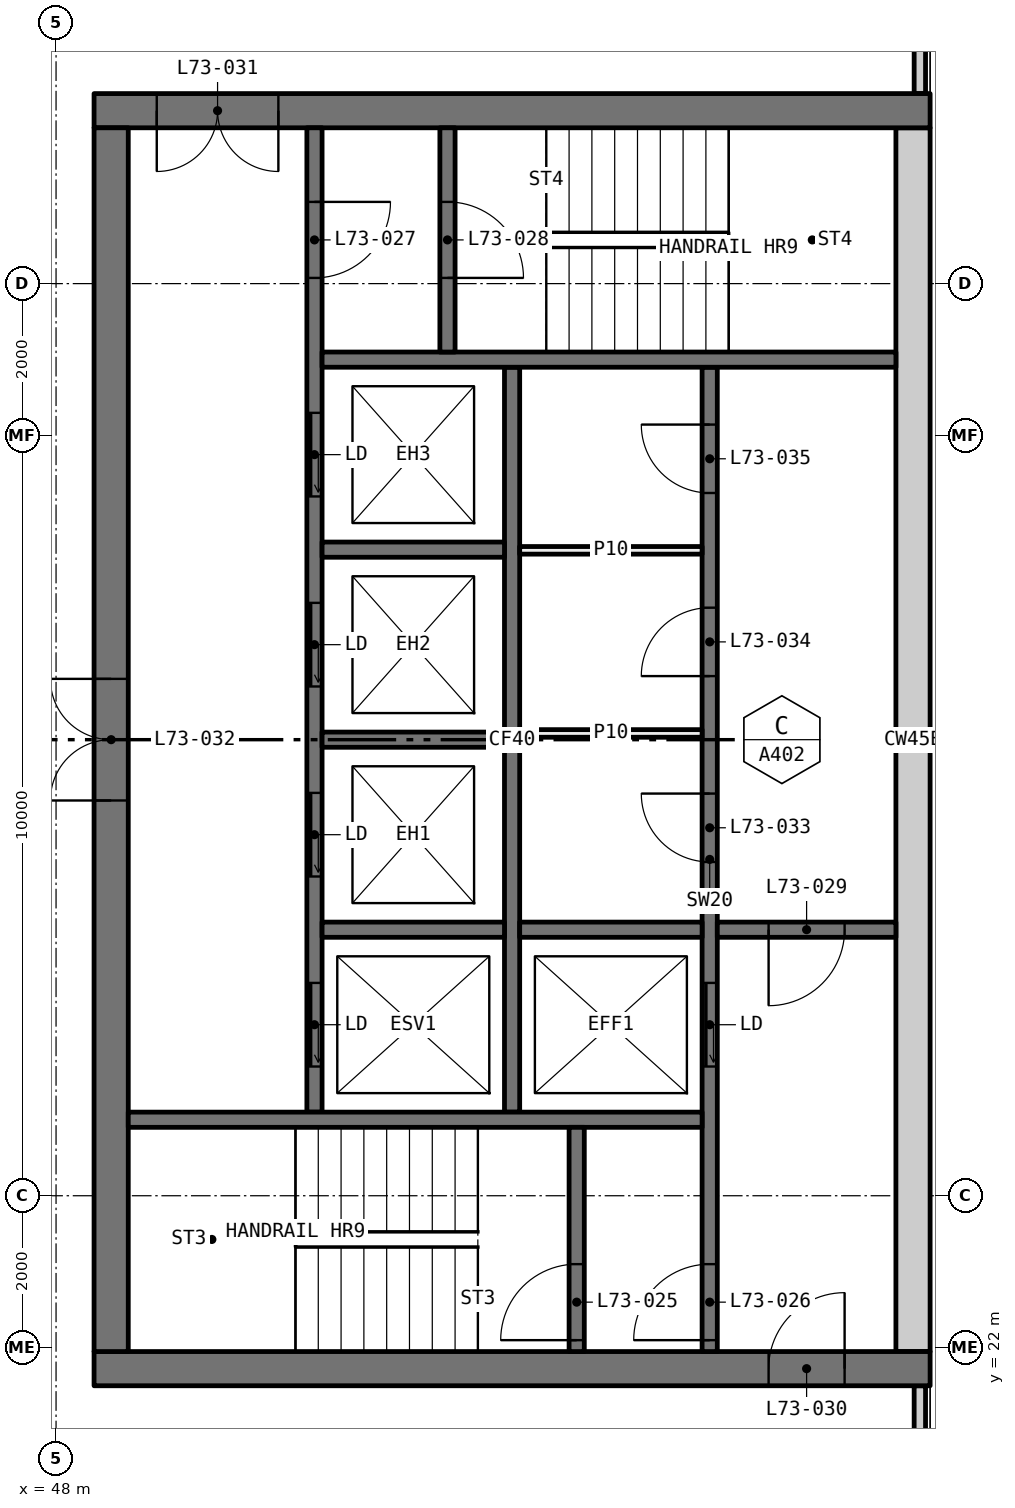
"""IFC4 building model, lengths in metres.
Left out: names, types, materials, properties, quantities, classifications, styles, units other than length and angle.
Written with IfcOpenShell. Run it as: python <this file> out.ifc"""

import sys

from ifc_helpers import new_model, si_unit, direction, frame, frame_2d, origin, place, context, subcontext, project, spatial, rectangle, extrude, element, fill, save


model = new_model("IFC4")
c1 = context("Model", 3, precision=1e-05, world=origin(), true_north=direction((0.0, 1.0)))
c2 = subcontext(c1, "Body", "Model", "MODEL_VIEW")
j1 = project(units=[si_unit("LENGTHUNIT", "METRE"), si_unit("PLANEANGLEUNIT", "RADIAN")], contexts=[c1])
p1 = place(None, origin())
s1 = spatial("IfcSite", under=j1, at=p1, CompositionType="ELEMENT")
p2 = place(p1, origin())
s2 = spatial("IfcBuilding", under=s1, at=p2, CompositionType="ELEMENT")
p3 = place(p2, frame((0.0, 0.0, 269.7)))
s3 = spatial("IfcBuildingStorey", under=s2, at=p3, CompositionType="ELEMENT", Elevation=269.7)
for number, where, z_axis, x_axis in (
    (1, (59.365, 18.71, 0.0), (0.0, 0.0, 1.0), (0.0, 1.0, 0.0)),
    (2, (59.365, 38.5, 0.0), (0.0, 0.0, 1.0), (0.0, 1.0, 0.0)),
):
    element("IfcWall", number, at=place(p3, frame(where, z_axis=z_axis, x_axis=x_axis)), inside=s3, PredefinedType="ELEMENTEDWALL", context=c2, shape_type="SweptSolid", body=[
        extrude(rectangle(XDim=2.79, YDim=0.15, at=frame_2d((1.395, 0.0))), origin(), (0.0, 0.0, 1.0), 3.05),
    ])
p4 = place(p3, frame((59.5, 21.725, 0.0), z_axis=(0.0, 0.0, 1.0), x_axis=(-1.0, 0.0, 0.0)))
e3 = element("IfcWall", 3, at=p4, inside=s3, PredefinedType="SHEAR", context=c2, shape_type="SweptSolid", body=[
    extrude(rectangle(XDim=11.0, YDim=0.45, at=frame_2d((5.5, 0.0))), origin(), (0.0, 0.0, 1.0), 3.05),
])
p5 = place(p4, frame((1.125, 0.0, 0.0)))
e4 = element("IfcOpeningElement", 4, at=p5, cuts=e3, PredefinedType="OPENING", context=c2, shape_type="SweptSolid", body=[
    extrude(rectangle(XDim=1.0, YDim=2.1, at=frame_2d((0.5, 1.05))), frame((0.0, 0.235, 0.0), z_axis=(0.0, -1.0, 0.0), x_axis=(1.0, 0.0, 0.0)), (0.0, 0.0, 1.0), 0.47),
])
p6 = place(p3, frame((59.5, 38.275, 0.0), z_axis=(0.0, 0.0, 1.0), x_axis=(-1.0, 0.0, 0.0)))
e5 = element("IfcWall", 5, at=p6, inside=s3, PredefinedType="SHEAR", context=c2, shape_type="SweptSolid", body=[
    extrude(rectangle(XDim=11.0, YDim=0.45, at=frame_2d((5.5, 0.0))), origin(), (0.0, 0.0, 1.0), 3.05),
])
p7 = place(p6, frame((8.575, 0.0, 0.0)))
e6 = element("IfcOpeningElement", 6, at=p7, cuts=e5, PredefinedType="OPENING", context=c2, shape_type="SweptSolid", body=[
    extrude(rectangle(XDim=1.6, YDim=2.1, at=frame_2d((0.8, 1.05))), frame((0.0, 0.235, 0.0), z_axis=(0.0, -1.0, 0.0), x_axis=(1.0, 0.0, 0.0)), (0.0, 0.0, 1.0), 0.47),
])
p8 = place(p3, frame((59.275, 21.95, 0.0), z_axis=(0.0, 0.0, 1.0), x_axis=(0.0, 1.0, 0.0)))
e7 = element("IfcWall", 7, at=p8, inside=s3, PredefinedType="SHEAR", context=c2, shape_type="SweptSolid", body=[
    extrude(rectangle(XDim=16.1, YDim=0.45, at=frame_2d((8.05, 0.0))), origin(), (0.0, 0.0, 1.0), 3.05),
])
p9 = place(p3, frame((48.725, 21.95, 0.0), z_axis=(0.0, 0.0, 1.0), x_axis=(0.0, 1.0, 0.0)))
e8 = element("IfcWall", 8, at=p9, inside=s3, PredefinedType="SHEAR", context=c2, shape_type="SweptSolid", body=[
    extrude(rectangle(XDim=16.1, YDim=0.45, at=frame_2d((8.05, 0.0))), origin(), (0.0, 0.0, 1.0), 3.05),
])
p10 = place(p9, frame((7.25, 0.0, 0.0)))
e9 = element("IfcOpeningElement", 9, at=p10, cuts=e8, PredefinedType="OPENING", context=c2, shape_type="SweptSolid", body=[
    extrude(rectangle(XDim=1.6, YDim=2.1, at=frame_2d((0.8, 1.05))), frame((0.0, 0.235, 0.0), z_axis=(0.0, -1.0, 0.0), x_axis=(1.0, 0.0, 0.0)), (0.0, 0.0, 1.0), 0.47),
])
p11 = place(p3, frame((56.6, 21.95, 0.0), z_axis=(0.0, 0.0, 1.0), x_axis=(0.0, 1.0, 0.0)))
e10 = element("IfcWall", 10, at=p11, inside=s3, PredefinedType="SOLIDWALL", context=c2, shape_type="SweptSolid", body=[
    extrude(rectangle(XDim=12.95, YDim=0.2, at=frame_2d((6.475, 0.0))), origin(), (0.0, 0.0, 1.0), 3.05),
])
p12 = place(p11, frame((3.75, 0.0, 0.0)))
e11 = element("IfcOpeningElement", 11, at=p12, cuts=e10, PredefinedType="OPENING", context=c2, shape_type="SweptSolid", body=[
    extrude(rectangle(XDim=1.1, YDim=2.1, at=frame_2d((0.55, 1.05))), frame((0.0, 0.11, 0.0), z_axis=(0.0, -1.0, 0.0), x_axis=(1.0, 0.0, 0.0)), (0.0, 0.0, 1.0), 0.22),
])
p13 = place(p11, frame((0.15, 0.0, 0.0)))
e12 = element("IfcOpeningElement", 12, at=p13, cuts=e10, PredefinedType="OPENING", context=c2, shape_type="SweptSolid", body=[
    extrude(rectangle(XDim=1.0, YDim=2.1, at=frame_2d((0.5, 1.05))), frame((0.0, 0.11, 0.0), z_axis=(0.0, -1.0, 0.0), x_axis=(1.0, 0.0, 0.0)), (0.0, 0.0, 1.0), 0.22),
])
p14 = place(p11, frame((6.441, 0.0, 0.0)))
e13 = element("IfcOpeningElement", 13, at=p14, cuts=e10, PredefinedType="OPENING", context=c2, shape_type="SweptSolid", body=[
    extrude(rectangle(XDim=0.9, YDim=2.1, at=frame_2d((0.45, 1.05))), frame((0.0, 0.11, 0.0), z_axis=(0.0, -1.0, 0.0), x_axis=(1.0, 0.0, 0.0)), (0.0, 0.0, 1.0), 0.22),
])
p15 = place(p11, frame((8.886, 0.0, 0.0)))
e14 = element("IfcOpeningElement", 14, at=p15, cuts=e10, PredefinedType="OPENING", context=c2, shape_type="SweptSolid", body=[
    extrude(rectangle(XDim=0.9, YDim=2.1, at=frame_2d((0.45, 1.05))), frame((0.0, 0.11, 0.0), z_axis=(0.0, -1.0, 0.0), x_axis=(1.0, 0.0, 0.0)), (0.0, 0.0, 1.0), 0.22),
])
p16 = place(p11, frame((11.295, 0.0, 0.0)))
e15 = element("IfcOpeningElement", 15, at=p16, cuts=e10, PredefinedType="OPENING", context=c2, shape_type="SweptSolid", body=[
    extrude(rectangle(XDim=0.9, YDim=2.1, at=frame_2d((0.45, 1.05))), frame((0.0, 0.11, 0.0), z_axis=(0.0, -1.0, 0.0), x_axis=(1.0, 0.0, 0.0)), (0.0, 0.0, 1.0), 0.22),
])
p17 = place(p3, frame((51.4, 25.1, 0.0), z_axis=(0.0, 0.0, 1.0), x_axis=(0.0, 1.0, 0.0)))
e16 = element("IfcWall", 16, at=p17, inside=s3, PredefinedType="SOLIDWALL", context=c2, shape_type="SweptSolid", body=[
    extrude(rectangle(XDim=12.95, YDim=0.2, at=frame_2d((6.475, 0.0))), origin(), (0.0, 0.0, 1.0), 3.05),
])
p18 = place(p17, frame((0.6, 0.0, 0.0)))
e17 = element("IfcOpeningElement", 17, at=p18, cuts=e16, PredefinedType="OPENING", context=c2, shape_type="SweptSolid", body=[
    extrude(rectangle(XDim=1.1, YDim=2.1, at=frame_2d((0.55, 1.05))), frame((0.0, 0.11, 0.0), z_axis=(0.0, -1.0, 0.0), x_axis=(1.0, 0.0, 0.0)), (0.0, 0.0, 1.0), 0.22),
])
p19 = place(p17, frame((3.1, 0.0, 0.0)))
e18 = element("IfcOpeningElement", 18, at=p19, cuts=e16, PredefinedType="OPENING", context=c2, shape_type="SweptSolid", body=[
    extrude(rectangle(XDim=1.1, YDim=2.1, at=frame_2d((0.55, 1.05))), frame((0.0, 0.11, 0.0), z_axis=(0.0, -1.0, 0.0), x_axis=(1.0, 0.0, 0.0)), (0.0, 0.0, 1.0), 0.22),
])
p20 = place(p17, frame((5.6, 0.0, 0.0)))
e19 = element("IfcOpeningElement", 19, at=p20, cuts=e16, PredefinedType="OPENING", context=c2, shape_type="SweptSolid", body=[
    extrude(rectangle(XDim=1.1, YDim=2.1, at=frame_2d((0.55, 1.05))), frame((0.0, 0.11, 0.0), z_axis=(0.0, -1.0, 0.0), x_axis=(1.0, 0.0, 0.0)), (0.0, 0.0, 1.0), 0.22),
])
p21 = place(p17, frame((8.1, 0.0, 0.0)))
e20 = element("IfcOpeningElement", 20, at=p21, cuts=e16, PredefinedType="OPENING", context=c2, shape_type="SweptSolid", body=[
    extrude(rectangle(XDim=1.1, YDim=2.1, at=frame_2d((0.55, 1.05))), frame((0.0, 0.11, 0.0), z_axis=(0.0, -1.0, 0.0), x_axis=(1.0, 0.0, 0.0)), (0.0, 0.0, 1.0), 0.22),
])
p22 = place(p17, frame((10.975, 0.0, 0.0)))
e21 = element("IfcOpeningElement", 21, at=p22, cuts=e16, PredefinedType="OPENING", context=c2, shape_type="SweptSolid", body=[
    extrude(rectangle(XDim=1.0, YDim=2.1, at=frame_2d((0.5, 1.05))), frame((0.0, 0.11, 0.0), z_axis=(0.0, -1.0, 0.0), x_axis=(1.0, 0.0, 0.0)), (0.0, 0.0, 1.0), 0.22),
])
p23 = place(p3, frame((54.0, 25.1, 0.0), z_axis=(0.0, 0.0, 1.0), x_axis=(0.0, 1.0, 0.0)))
e22 = element("IfcWall", 22, at=p23, inside=s3, PredefinedType="SOLIDWALL", context=c2, shape_type="SweptSolid", body=[
    extrude(rectangle(XDim=9.8, YDim=0.2, at=frame_2d((4.9, 0.0))), origin(), (0.0, 0.0, 1.0), 3.05),
])
for number, where, z_axis, x_axis in (
    (23, (56.5, 25.0, 0.0), (0.0, 0.0, 1.0), (-1.0, 0.0, 0.0)),
    (24, (59.05, 35.0, 0.0), (0.0, 0.0, 1.0), (-1.0, 0.0, 0.0)),
):
    element("IfcWall", number, at=place(p3, frame(where, z_axis=z_axis, x_axis=x_axis)), inside=s3, PredefinedType="SOLIDWALL", context=c2, shape_type="SweptSolid", body=[
        extrude(rectangle(XDim=7.55, YDim=0.2, at=frame_2d((3.775, 0.0))), origin(), (0.0, 0.0, 1.0), 3.05),
    ])
p24 = place(p3, frame((59.05, 27.5, 0.0), z_axis=(0.0, 0.0, 1.0), x_axis=(-1.0, 0.0, 0.0)))
e25 = element("IfcWall", 25, at=p24, inside=s3, PredefinedType="SOLIDWALL", context=c2, shape_type="SweptSolid", body=[
    extrude(rectangle(XDim=2.35, YDim=0.2, at=frame_2d((1.175, 0.0))), origin(), (0.0, 0.0, 1.0), 3.05),
])
p25 = place(p24, frame((0.675, 0.0, 0.0)))
e26 = element("IfcOpeningElement", 26, at=p25, cuts=e25, PredefinedType="OPENING", context=c2, shape_type="SweptSolid", body=[
    extrude(rectangle(XDim=1.0, YDim=2.1, at=frame_2d((0.5, 1.05))), frame((0.0, 0.11, 0.0), z_axis=(0.0, -1.0, 0.0), x_axis=(1.0, 0.0, 0.0)), (0.0, 0.0, 1.0), 0.22),
])
p26 = place(p3, frame((54.85, 21.95, 0.0), z_axis=(0.0, 0.0, 1.0), x_axis=(0.0, 1.0, 0.0)))
e27 = element("IfcWall", 27, at=p26, inside=s3, PredefinedType="SOLIDWALL", context=c2, shape_type="SweptSolid", body=[
    extrude(rectangle(XDim=2.95, YDim=0.2, at=frame_2d((1.475, 0.0))), origin(), (0.0, 0.0, 1.0), 3.05),
])
p27 = place(p26, frame((0.15, 0.0, 0.0)))
e28 = element("IfcOpeningElement", 28, at=p27, cuts=e27, PredefinedType="OPENING", context=c2, shape_type="SweptSolid", body=[
    extrude(rectangle(XDim=1.0, YDim=2.1, at=frame_2d((0.5, 1.05))), frame((0.0, 0.11, 0.0), z_axis=(0.0, -1.0, 0.0), x_axis=(1.0, 0.0, 0.0)), (0.0, 0.0, 1.0), 0.22),
])
p28 = place(p3, frame((53.15, 35.1, 0.0), z_axis=(0.0, 0.0, 1.0), x_axis=(0.0, 1.0, 0.0)))
e29 = element("IfcWall", 29, at=p28, inside=s3, PredefinedType="SOLIDWALL", context=c2, shape_type="SweptSolid", body=[
    extrude(rectangle(XDim=2.95, YDim=0.2, at=frame_2d((1.475, 0.0))), origin(), (0.0, 0.0, 1.0), 3.05),
])
p29 = place(p28, frame((0.975, 0.0, 0.0)))
e30 = element("IfcOpeningElement", 30, at=p29, cuts=e29, PredefinedType="OPENING", context=c2, shape_type="SweptSolid", body=[
    extrude(rectangle(XDim=1.0, YDim=2.1, at=frame_2d((0.5, 1.05))), frame((0.0, 0.11, 0.0), z_axis=(0.0, -1.0, 0.0), x_axis=(1.0, 0.0, 0.0)), (0.0, 0.0, 1.0), 0.22),
])
for number, where, z_axis, x_axis in (
    (31, (56.5, 27.5, 0.0), (0.0, 0.0, 1.0), (-1.0, 0.0, 0.0)),
    (32, (53.9, 27.5, 0.0), (0.0, 0.0, 1.0), (-1.0, 0.0, 0.0)),
    (33, (53.9, 30.0, 0.0), (0.0, 0.0, 1.0), (-1.0, 0.0, 0.0)),
    (34, (53.9, 32.5, 0.0), (0.0, 0.0, 1.0), (-1.0, 0.0, 0.0)),
):
    element("IfcWall", number, at=place(p3, frame(where, z_axis=z_axis, x_axis=x_axis)), inside=s3, PredefinedType="SOLIDWALL", context=c2, shape_type="SweptSolid", body=[
        extrude(rectangle(XDim=2.4, YDim=0.2, at=frame_2d((1.2, 0.0))), origin(), (0.0, 0.0, 1.0), 3.05),
    ])
for number, where, z_axis, x_axis in (
    (35, (56.5, 30.082, 0.0), (0.0, 0.0, 1.0), (-1.0, 0.0, 0.0)),
    (36, (56.5, 32.491, 0.0), (0.0, 0.0, 1.0), (-1.0, 0.0, 0.0)),
):
    element("IfcWall", number, at=place(p3, frame(where, z_axis=z_axis, x_axis=x_axis)), inside=s3, PredefinedType="PARTITIONING", context=c2, shape_type="SweptSolid", body=[
        extrude(rectangle(XDim=2.4, YDim=0.1, at=frame_2d((1.2, 0.0))), origin(), (0.0, 0.0, 1.0), 3.05),
    ])
p30 = place(p18, origin())
e37 = element("IfcDoor", 37, at=p30, inside=s3, OperationType="SLIDING_TO_LEFT", PredefinedType="DOOR", context=c2, shape_type="SweptSolid", body=[
    extrude(rectangle(XDim=1.1, YDim=2.1, at=frame_2d((0.55, 1.05))), frame((0.0, 0.025, 0.0), z_axis=(0.0, -1.0, 0.0), x_axis=(1.0, 0.0, 0.0)), (0.0, 0.0, 1.0), 0.05),
])
fill(e17, e37)
p31 = place(p19, origin())
e38 = element("IfcDoor", 38, at=p31, inside=s3, OperationType="SLIDING_TO_LEFT", PredefinedType="DOOR", context=c2, shape_type="SweptSolid", body=[
    extrude(rectangle(XDim=1.1, YDim=2.1, at=frame_2d((0.55, 1.05))), frame((0.0, 0.025, 0.0), z_axis=(0.0, -1.0, 0.0), x_axis=(1.0, 0.0, 0.0)), (0.0, 0.0, 1.0), 0.05),
])
fill(e18, e38)
p32 = place(p20, origin())
e39 = element("IfcDoor", 39, at=p32, inside=s3, OperationType="SLIDING_TO_LEFT", PredefinedType="DOOR", context=c2, shape_type="SweptSolid", body=[
    extrude(rectangle(XDim=1.1, YDim=2.1, at=frame_2d((0.55, 1.05))), frame((0.0, 0.025, 0.0), z_axis=(0.0, -1.0, 0.0), x_axis=(1.0, 0.0, 0.0)), (0.0, 0.0, 1.0), 0.05),
])
fill(e19, e39)
p33 = place(p21, origin())
e40 = element("IfcDoor", 40, at=p33, inside=s3, OperationType="SLIDING_TO_LEFT", PredefinedType="DOOR", context=c2, shape_type="SweptSolid", body=[
    extrude(rectangle(XDim=1.1, YDim=2.1, at=frame_2d((0.55, 1.05))), frame((0.0, 0.025, 0.0), z_axis=(0.0, -1.0, 0.0), x_axis=(1.0, 0.0, 0.0)), (0.0, 0.0, 1.0), 0.05),
])
fill(e20, e40)
p34 = place(p12, origin())
e41 = element("IfcDoor", 41, at=p34, inside=s3, OperationType="SLIDING_TO_LEFT", PredefinedType="DOOR", context=c2, shape_type="SweptSolid", body=[
    extrude(rectangle(XDim=1.1, YDim=2.1, at=frame_2d((0.55, 1.05))), frame((0.0, 0.025, 0.0), z_axis=(0.0, -1.0, 0.0), x_axis=(1.0, 0.0, 0.0)), (0.0, 0.0, 1.0), 0.05),
])
fill(e11, e41)
p35 = place(p27, origin())
e42 = element("IfcDoor", 42, at=p35, inside=s3, OperationType="SINGLE_SWING_RIGHT", PredefinedType="DOOR", context=c2, shape_type="SweptSolid", body=[
    extrude(rectangle(XDim=1.0, YDim=2.1, at=frame_2d((0.5, 1.05))), frame((0.0, 0.025, 0.0), z_axis=(0.0, -1.0, 0.0), x_axis=(1.0, 0.0, 0.0)), (0.0, 0.0, 1.0), 0.05),
])
fill(e28, e42)
p36 = place(p13, origin())
e43 = element("IfcDoor", 43, at=p36, inside=s3, OperationType="SINGLE_SWING_RIGHT", PredefinedType="DOOR", context=c2, shape_type="SweptSolid", body=[
    extrude(rectangle(XDim=1.0, YDim=2.1, at=frame_2d((0.5, 1.05))), frame((0.0, 0.025, 0.0), z_axis=(0.0, -1.0, 0.0), x_axis=(1.0, 0.0, 0.0)), (0.0, 0.0, 1.0), 0.05),
])
fill(e12, e43)
p37 = place(p22, frame((1.0, 0.0, 0.0), x_axis=(-1.0, 0.0, 0.0)))
e44 = element("IfcDoor", 44, at=p37, inside=s3, OperationType="SINGLE_SWING_RIGHT", PredefinedType="DOOR", context=c2, shape_type="SweptSolid", body=[
    extrude(rectangle(XDim=1.0, YDim=2.1, at=frame_2d((0.5, 1.05))), frame((0.0, 0.025, 0.0), z_axis=(0.0, -1.0, 0.0), x_axis=(1.0, 0.0, 0.0)), (0.0, 0.0, 1.0), 0.05),
])
fill(e21, e44)
p38 = place(p29, frame((1.0, 0.0, 0.0), x_axis=(-1.0, 0.0, 0.0)))
e45 = element("IfcDoor", 45, at=p38, inside=s3, OperationType="SINGLE_SWING_LEFT", PredefinedType="DOOR", context=c2, shape_type="SweptSolid", body=[
    extrude(rectangle(XDim=1.0, YDim=2.1, at=frame_2d((0.5, 1.05))), frame((0.0, 0.025, 0.0), z_axis=(0.0, -1.0, 0.0), x_axis=(1.0, 0.0, 0.0)), (0.0, 0.0, 1.0), 0.05),
])
fill(e30, e45)
p39 = place(p25, origin())
e46 = element("IfcDoor", 46, at=p39, inside=s3, OperationType="SINGLE_SWING_LEFT", PredefinedType="DOOR", context=c2, shape_type="SweptSolid", body=[
    extrude(rectangle(XDim=1.0, YDim=2.1, at=frame_2d((0.5, 1.05))), frame((0.0, 0.025, 0.0), z_axis=(0.0, -1.0, 0.0), x_axis=(1.0, 0.0, 0.0)), (0.0, 0.0, 1.0), 0.05),
])
fill(e26, e46)
p40 = place(p5, frame((1.0, 0.0, 0.0), x_axis=(-1.0, 0.0, 0.0)))
e47 = element("IfcDoor", 47, at=p40, inside=s3, OperationType="SINGLE_SWING_LEFT", PredefinedType="DOOR", context=c2, shape_type="SweptSolid", body=[
    extrude(rectangle(XDim=1.0, YDim=2.1, at=frame_2d((0.5, 1.05))), frame((0.0, 0.025, 0.0), z_axis=(0.0, -1.0, 0.0), x_axis=(1.0, 0.0, 0.0)), (0.0, 0.0, 1.0), 0.05),
])
fill(e4, e47)
p41 = place(p7, origin())
e48 = element("IfcDoor", 48, at=p41, inside=s3, OperationType="DOUBLE_DOOR_SINGLE_SWING", PredefinedType="DOOR", context=c2, shape_type="SweptSolid", body=[
    extrude(rectangle(XDim=1.6, YDim=2.1, at=frame_2d((0.8, 1.05))), frame((0.0, 0.025, 0.0), z_axis=(0.0, -1.0, 0.0), x_axis=(1.0, 0.0, 0.0)), (0.0, 0.0, 1.0), 0.05),
])
fill(e6, e48)
p42 = place(p10, origin())
e49 = element("IfcDoor", 49, at=p42, inside=s3, OperationType="DOUBLE_DOOR_SINGLE_SWING", PredefinedType="DOOR", context=c2, shape_type="SweptSolid", body=[
    extrude(rectangle(XDim=1.6, YDim=2.1, at=frame_2d((0.8, 1.05))), frame((0.0, 0.025, 0.0), z_axis=(0.0, -1.0, 0.0), x_axis=(1.0, 0.0, 0.0)), (0.0, 0.0, 1.0), 0.05),
])
fill(e9, e49)
p43 = place(p14, origin())
e50 = element("IfcDoor", 50, at=p43, inside=s3, OperationType="SINGLE_SWING_LEFT", PredefinedType="DOOR", context=c2, shape_type="SweptSolid", body=[
    extrude(rectangle(XDim=0.9, YDim=2.1, at=frame_2d((0.45, 1.05))), frame((0.0, 0.025, 0.0), z_axis=(0.0, -1.0, 0.0), x_axis=(1.0, 0.0, 0.0)), (0.0, 0.0, 1.0), 0.05),
])
fill(e13, e50)
p44 = place(p15, origin())
e51 = element("IfcDoor", 51, at=p44, inside=s3, OperationType="SINGLE_SWING_RIGHT", PredefinedType="DOOR", context=c2, shape_type="SweptSolid", body=[
    extrude(rectangle(XDim=0.9, YDim=2.1, at=frame_2d((0.45, 1.05))), frame((0.0, 0.025, 0.0), z_axis=(0.0, -1.0, 0.0), x_axis=(1.0, 0.0, 0.0)), (0.0, 0.0, 1.0), 0.05),
])
fill(e14, e51)
p45 = place(p16, origin())
e52 = element("IfcDoor", 52, at=p45, inside=s3, OperationType="SINGLE_SWING_LEFT", PredefinedType="DOOR", context=c2, shape_type="SweptSolid", body=[
    extrude(rectangle(XDim=0.9, YDim=2.1, at=frame_2d((0.45, 1.05))), frame((0.0, 0.025, 0.0), z_axis=(0.0, -1.0, 0.0), x_axis=(1.0, 0.0, 0.0)), (0.0, 0.0, 1.0), 0.05),
])
fill(e15, e52)
save(model, sys.argv[1])
